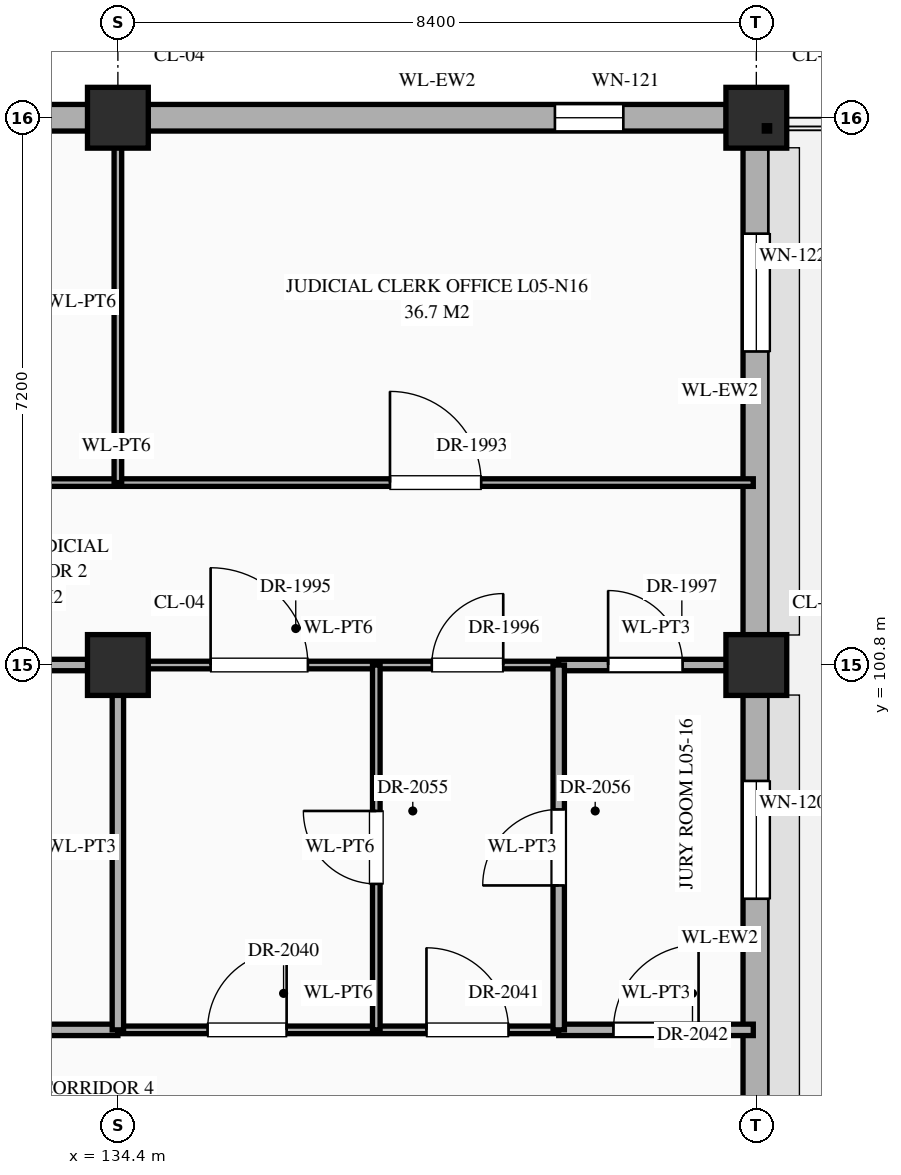
"""IFC4 building model, lengths in metres.
Left out: names, types, materials, properties, quantities, classifications, styles, units other than length and angle.
Written with IfcOpenShell. Run it as: python <this file> out.ifc"""

import sys

from ifc_helpers import new_model, si_unit, direction, frame, frame_2d, origin, origin_2d, place, context, subcontext, project, spatial, rectangle, extrude, element, fill, save


model = new_model("IFC4")
c1 = context("Model", 3, precision=1e-05, world=origin(), true_north=direction((0.0, 1.0)))
c2 = subcontext(c1, "Body", "Model", "MODEL_VIEW")
j1 = project(units=[si_unit("LENGTHUNIT", "METRE"), si_unit("PLANEANGLEUNIT", "RADIAN")], contexts=[c1])
p1 = place(None, origin())
s1 = spatial("IfcSite", under=j1, at=p1, CompositionType="ELEMENT")
p2 = place(p1, origin())
s2 = spatial("IfcBuilding", under=s1, at=p2, CompositionType="ELEMENT")
p3 = place(p2, frame((0.0, 0.0, 21.6)))
s3 = spatial("IfcBuildingStorey", under=s2, at=p3, CompositionType="ELEMENT", Elevation=21.6)
for number, where, z_axis, x_axis in (
    (1, (134.4, 100.8, 0.0), (0.0, 0.0, 1.0), (1.0, 0.0, 0.0)),
    (2, (134.4, 108.0, 0.0), (0.0, 0.0, 1.0), (1.0, 0.0, 0.0)),
    (3, (142.8, 100.8, 0.0), (0.0, 0.0, 1.0), (1.0, 0.0, 0.0)),
    (4, (142.8, 108.0, 0.0), (0.0, 0.0, 1.0), (1.0, 0.0, 0.0)),
):
    element("IfcColumn", number, at=place(p3, frame(where, z_axis=z_axis, x_axis=x_axis)), inside=s3, PredefinedType="COLUMN", context=c2, shape_type="SweptSolid", body=[
        extrude(rectangle(XDim=0.8, YDim=0.8, at=origin_2d()), origin(), (0.0, 0.0, 1.0), 4.5),
    ])
p4 = place(p3, frame((126.395, 108.0, 0.0), z_axis=(0.0, 0.0, 1.0), x_axis=(1.0, 0.0, 0.0)))
e5 = element("IfcWall", 5, at=p4, inside=s3, PredefinedType="STANDARD", context=c2, shape_type="SweptSolid", body=[
    extrude(rectangle(XDim=7.61, YDim=0.35, at=frame_2d((3.805, 0.0))), origin(), (0.0, 0.0, 1.0), 3.59),
])
p5 = place(p4, frame((5.355, 0.0, 0.85)))
e6 = element("IfcOpeningElement", 6, at=p5, cuts=e5, PredefinedType="OPENING", context=c2, shape_type="SweptSolid", body=[
    extrude(rectangle(XDim=0.9, YDim=1.92, at=frame_2d((0.45, 0.96))), frame((0.0, 0.187, 0.0), z_axis=(0.0, -1.0, 0.0), x_axis=(1.0, 0.0, 0.0)), (0.0, 0.0, 1.0), 0.374),
])
p6 = place(p3, frame((142.8, 93.995, 0.0), z_axis=(0.0, 0.0, 1.0), x_axis=(0.0, 1.0, 0.0)))
e7 = element("IfcWall", 7, at=p6, inside=s3, PredefinedType="STANDARD", context=c2, shape_type="SweptSolid", body=[
    extrude(rectangle(XDim=6.41, YDim=0.35, at=frame_2d((3.205, 0.0))), origin(), (0.0, 0.0, 1.0), 3.59),
])
p7 = place(p6, frame((3.73, 0.0, 0.85)))
e8 = element("IfcOpeningElement", 8, at=p7, cuts=e7, PredefinedType="OPENING", context=c2, shape_type="SweptSolid", body=[
    extrude(rectangle(XDim=1.55, YDim=1.38, at=frame_2d((0.775, 0.69))), frame((0.0, 0.187, 0.0), z_axis=(0.0, -1.0, 0.0), x_axis=(1.0, 0.0, 0.0)), (0.0, 0.0, 1.0), 0.374),
])
p8 = place(p3, frame((134.795, 108.0, 0.0), z_axis=(0.0, 0.0, 1.0), x_axis=(1.0, 0.0, 0.0)))
e9 = element("IfcWall", 9, at=p8, inside=s3, PredefinedType="STANDARD", context=c2, shape_type="SweptSolid", body=[
    extrude(rectangle(XDim=7.61, YDim=0.35, at=frame_2d((3.805, 0.0))), origin(), (0.0, 0.0, 1.0), 3.59),
])
p9 = place(p8, frame((5.355, 0.0, 0.85)))
e10 = element("IfcOpeningElement", 10, at=p9, cuts=e9, PredefinedType="OPENING", context=c2, shape_type="SweptSolid", body=[
    extrude(rectangle(XDim=0.9, YDim=2.12, at=frame_2d((0.45, 1.06))), frame((0.0, 0.187, 0.0), z_axis=(0.0, -1.0, 0.0), x_axis=(1.0, 0.0, 0.0)), (0.0, 0.0, 1.0), 0.374),
])
p10 = place(p3, frame((142.8, 101.195, 0.0), z_axis=(0.0, 0.0, 1.0), x_axis=(0.0, 1.0, 0.0)))
e11 = element("IfcWall", 11, at=p10, inside=s3, PredefinedType="STANDARD", context=c2, shape_type="SweptSolid", body=[
    extrude(rectangle(XDim=6.41, YDim=0.35, at=frame_2d((3.205, 0.0))), origin(), (0.0, 0.0, 1.0), 3.59),
])
p11 = place(p10, frame((3.73, 0.0, 0.85)))
e12 = element("IfcOpeningElement", 12, at=p11, cuts=e11, PredefinedType="OPENING", context=c2, shape_type="SweptSolid", body=[
    extrude(rectangle(XDim=1.55, YDim=1.56, at=frame_2d((0.775, 0.78))), frame((0.0, 0.187, 0.0), z_axis=(0.0, -1.0, 0.0), x_axis=(1.0, 0.0, 0.0)), (0.0, 0.0, 1.0), 0.374),
])
p12 = place(p3, frame((115.0, 96.0, 0.0), z_axis=(0.0, 0.0, 1.0), x_axis=(1.0, 0.0, 0.0)))
e13 = element("IfcWall", 13, at=p12, inside=s3, PredefinedType="STANDARD", context=c2, shape_type="SweptSolid", body=[
    extrude(rectangle(XDim=19.4, YDim=0.15, at=frame_2d((9.7, 0.0))), origin(), (0.0, 0.0, 1.0), 4.24),
])
p13 = place(p12, frame((0.81, 0.0, 0.0)))
e14 = element("IfcOpeningElement", 14, at=p13, cuts=e13, PredefinedType="OPENING", context=c2, shape_type="SweptSolid", body=[
    extrude(rectangle(XDim=0.98, YDim=2.35, at=frame_2d((0.49, 1.175))), frame((0.0, 0.087, 0.0), z_axis=(0.0, -1.0, 0.0), x_axis=(1.0, 0.0, 0.0)), (0.0, 0.0, 1.0), 0.174),
])
p14 = place(p12, frame((6.32, 0.0, 0.0)))
e15 = element("IfcOpeningElement", 15, at=p14, cuts=e13, PredefinedType="OPENING", context=c2, shape_type="SweptSolid", body=[
    extrude(rectangle(XDim=0.96, YDim=2.2, at=frame_2d((0.48, 1.1))), frame((0.0, 0.087, 0.0), z_axis=(0.0, -1.0, 0.0), x_axis=(1.0, 0.0, 0.0)), (0.0, 0.0, 1.0), 0.174),
])
p15 = place(p12, frame((14.7, 0.0, 0.0)))
e16 = element("IfcOpeningElement", 16, at=p15, cuts=e13, PredefinedType="OPENING", context=c2, shape_type="SweptSolid", body=[
    extrude(rectangle(XDim=1.0, YDim=2.25, at=frame_2d((0.5, 1.125))), frame((0.0, 0.087, 0.0), z_axis=(0.0, -1.0, 0.0), x_axis=(1.0, 0.0, 0.0)), (0.0, 0.0, 1.0), 0.174),
])
p16 = place(p3, frame((134.4, 96.0, 0.0), z_axis=(0.0, 0.0, 1.0), x_axis=(1.0, 0.0, 0.0)))
e17 = element("IfcWall", 17, at=p16, inside=s3, PredefinedType="STANDARD", context=c2, shape_type="SweptSolid", body=[
    extrude(rectangle(XDim=5.8, YDim=0.1, at=frame_2d((2.9, 0.0))), origin(), (0.0, 0.0, 1.0), 4.24),
])
p17 = place(p16, frame((1.18, 0.0, 0.0)))
e18 = element("IfcOpeningElement", 18, at=p17, cuts=e17, PredefinedType="OPENING", context=c2, shape_type="SweptSolid", body=[
    extrude(rectangle(XDim=1.04, YDim=2.2, at=frame_2d((0.52, 1.1))), frame((0.0, 0.062, 0.0), z_axis=(0.0, -1.0, 0.0), x_axis=(1.0, 0.0, 0.0)), (0.0, 0.0, 1.0), 0.124),
])
p18 = place(p16, frame((4.06, 0.0, 0.0)))
e19 = element("IfcOpeningElement", 19, at=p18, cuts=e17, PredefinedType="OPENING", context=c2, shape_type="SweptSolid", body=[
    extrude(rectangle(XDim=1.08, YDim=2.25, at=frame_2d((0.54, 1.125))), frame((0.0, 0.062, 0.0), z_axis=(0.0, -1.0, 0.0), x_axis=(1.0, 0.0, 0.0)), (0.0, 0.0, 1.0), 0.124),
])
p19 = place(p3, frame((140.2, 96.0, 0.0), z_axis=(0.0, 0.0, 1.0), x_axis=(1.0, 0.0, 0.0)))
e20 = element("IfcWall", 20, at=p19, inside=s3, PredefinedType="STANDARD", context=c2, shape_type="SweptSolid", body=[
    extrude(rectangle(XDim=2.56, YDim=0.15, at=frame_2d((1.28, 0.0))), origin(), (0.0, 0.0, 1.0), 4.24),
])
p20 = place(p19, frame((0.72, 0.0, 0.0)))
e21 = element("IfcOpeningElement", 21, at=p20, cuts=e20, PredefinedType="OPENING", context=c2, shape_type="SweptSolid", body=[
    extrude(rectangle(XDim=1.12, YDim=2.25, at=frame_2d((0.56, 1.125))), frame((0.0, 0.087, 0.0), z_axis=(0.0, -1.0, 0.0), x_axis=(1.0, 0.0, 0.0)), (0.0, 0.0, 1.0), 0.174),
])
p21 = place(p3, frame((126.0, 100.8, 0.0), z_axis=(0.0, 0.0, 1.0), x_axis=(1.0, 0.0, 0.0)))
e22 = element("IfcWall", 22, at=p21, inside=s3, PredefinedType="STANDARD", context=c2, shape_type="SweptSolid", body=[
    extrude(rectangle(XDim=8.4, YDim=0.15, at=frame_2d((4.2, 0.0))), origin(), (0.0, 0.0, 1.0), 3.39),
])
p22 = place(p21, frame((3.58, 0.0, 0.0)))
e23 = element("IfcOpeningElement", 23, at=p22, cuts=e22, PredefinedType="OPENING", context=c2, shape_type="SweptSolid", body=[
    extrude(rectangle(XDim=1.24, YDim=2.3, at=frame_2d((0.62, 1.15))), frame((0.0, 0.087, 0.0), z_axis=(0.0, -1.0, 0.0), x_axis=(1.0, 0.0, 0.0)), (0.0, 0.0, 1.0), 0.174),
])
p23 = place(p3, frame((134.4, 100.8, 0.0), z_axis=(0.0, 0.0, 1.0), x_axis=(1.0, 0.0, 0.0)))
e24 = element("IfcWall", 24, at=p23, inside=s3, PredefinedType="STANDARD", context=c2, shape_type="SweptSolid", body=[
    extrude(rectangle(XDim=5.8, YDim=0.1, at=frame_2d((2.9, 0.0))), origin(), (0.0, 0.0, 1.0), 3.39),
])
p24 = place(p23, frame((1.22, 0.0, 0.0)))
e25 = element("IfcOpeningElement", 25, at=p24, cuts=e24, PredefinedType="OPENING", context=c2, shape_type="SweptSolid", body=[
    extrude(rectangle(XDim=1.28, YDim=2.35, at=frame_2d((0.64, 1.175))), frame((0.0, 0.062, 0.0), z_axis=(0.0, -1.0, 0.0), x_axis=(1.0, 0.0, 0.0)), (0.0, 0.0, 1.0), 0.124),
])
p25 = place(p23, frame((4.13, 0.0, 0.0)))
e26 = element("IfcOpeningElement", 26, at=p25, cuts=e24, PredefinedType="OPENING", context=c2, shape_type="SweptSolid", body=[
    extrude(rectangle(XDim=0.94, YDim=2.3, at=frame_2d((0.47, 1.15))), frame((0.0, 0.062, 0.0), z_axis=(0.0, -1.0, 0.0), x_axis=(1.0, 0.0, 0.0)), (0.0, 0.0, 1.0), 0.124),
])
p26 = place(p3, frame((140.2, 100.8, 0.0), z_axis=(0.0, 0.0, 1.0), x_axis=(1.0, 0.0, 0.0)))
e27 = element("IfcWall", 27, at=p26, inside=s3, PredefinedType="STANDARD", context=c2, shape_type="SweptSolid", body=[
    extrude(rectangle(XDim=2.56, YDim=0.15, at=frame_2d((1.28, 0.0))), origin(), (0.0, 0.0, 1.0), 3.39),
])
p27 = place(p26, frame((0.65, 0.0, 0.0)))
e28 = element("IfcOpeningElement", 28, at=p27, cuts=e27, PredefinedType="OPENING", context=c2, shape_type="SweptSolid", body=[
    extrude(rectangle(XDim=0.98, YDim=2.35, at=frame_2d((0.49, 1.175))), frame((0.0, 0.087, 0.0), z_axis=(0.0, -1.0, 0.0), x_axis=(1.0, 0.0, 0.0)), (0.0, 0.0, 1.0), 0.174),
])
p28 = place(p3, frame((126.0, 103.2, 0.0), z_axis=(0.0, 0.0, 1.0), x_axis=(1.0, 0.0, 0.0)))
e29 = element("IfcWall", 29, at=p28, inside=s3, PredefinedType="STANDARD", context=c2, shape_type="SweptSolid", body=[
    extrude(rectangle(XDim=16.76, YDim=0.1, at=frame_2d((8.38, 0.0))), origin(), (0.0, 0.0, 1.0), 4.24),
])
p29 = place(p28, frame((3.62, 0.0, 0.0)))
e30 = element("IfcOpeningElement", 30, at=p29, cuts=e29, PredefinedType="OPENING", context=c2, shape_type="SweptSolid", body=[
    extrude(rectangle(XDim=1.16, YDim=2.3, at=frame_2d((0.58, 1.15))), frame((0.0, 0.062, 0.0), z_axis=(0.0, -1.0, 0.0), x_axis=(1.0, 0.0, 0.0)), (0.0, 0.0, 1.0), 0.124),
])
p30 = place(p28, frame((11.98, 0.0, 0.0)))
e31 = element("IfcOpeningElement", 31, at=p30, cuts=e29, PredefinedType="OPENING", context=c2, shape_type="SweptSolid", body=[
    extrude(rectangle(XDim=1.2, YDim=2.35, at=frame_2d((0.6, 1.175))), frame((0.0, 0.062, 0.0), z_axis=(0.0, -1.0, 0.0), x_axis=(1.0, 0.0, 0.0)), (0.0, 0.0, 1.0), 0.124),
])
p31 = place(p3, frame((134.4, 96.0, 0.0), z_axis=(0.0, 0.0, 1.0), x_axis=(0.0, 1.0, 0.0)))
e32 = element("IfcWall", 32, at=p31, inside=s3, PredefinedType="STANDARD", context=c2, shape_type="SweptSolid", body=[
    extrude(rectangle(XDim=4.8, YDim=0.15, at=frame_2d((2.4, 0.0))), origin(), (0.0, 0.0, 1.0), 4.24),
])
p32 = place(p3, frame((134.4, 103.2, 0.0), z_axis=(0.0, 0.0, 1.0), x_axis=(0.0, 1.0, 0.0)))
e33 = element("IfcWall", 33, at=p32, inside=s3, PredefinedType="STANDARD", context=c2, shape_type="SweptSolid", body=[
    extrude(rectangle(XDim=4.76, YDim=0.1, at=frame_2d((2.38, 0.0))), origin(), (0.0, 0.0, 1.0), 3.49),
])
p33 = place(p3, frame((137.8, 96.0, 0.0), z_axis=(0.0, 0.0, 1.0), x_axis=(0.0, 1.0, 0.0)))
e34 = element("IfcWall", 34, at=p33, inside=s3, PredefinedType="STANDARD", context=c2, shape_type="SweptSolid", body=[
    extrude(rectangle(XDim=4.8, YDim=0.1, at=frame_2d((2.4, 0.0))), origin(), (0.0, 0.0, 1.0), 4.24),
])
p34 = place(p33, frame((1.92, 0.0, 0.0)))
e35 = element("IfcOpeningElement", 35, at=p34, cuts=e34, PredefinedType="OPENING", context=c2, shape_type="SweptSolid", body=[
    extrude(rectangle(XDim=0.96, YDim=2.2, at=frame_2d((0.48, 1.1))), frame((0.0, 0.062, 0.0), z_axis=(0.0, -1.0, 0.0), x_axis=(1.0, 0.0, 0.0)), (0.0, 0.0, 1.0), 0.124),
])
p35 = place(p3, frame((140.2, 96.0, 0.0), z_axis=(0.0, 0.0, 1.0), x_axis=(0.0, 1.0, 0.0)))
e36 = element("IfcWall", 36, at=p35, inside=s3, PredefinedType="STANDARD", context=c2, shape_type="SweptSolid", body=[
    extrude(rectangle(XDim=4.8, YDim=0.15, at=frame_2d((2.4, 0.0))), origin(), (0.0, 0.0, 1.0), 4.24),
])
p36 = place(p35, frame((1.9, 0.0, 0.0)))
e37 = element("IfcOpeningElement", 37, at=p36, cuts=e36, PredefinedType="OPENING", context=c2, shape_type="SweptSolid", body=[
    extrude(rectangle(XDim=1.0, YDim=2.25, at=frame_2d((0.5, 1.125))), frame((0.0, 0.087, 0.0), z_axis=(0.0, -1.0, 0.0), x_axis=(1.0, 0.0, 0.0)), (0.0, 0.0, 1.0), 0.174),
])
p37 = place(p7, origin())
e38 = element("IfcWindow", 38, at=p37, inside=s3, PartitioningType="SINGLE_PANEL", PredefinedType="WINDOW", context=c2, shape_type="SweptSolid", body=[
    extrude(rectangle(XDim=1.55, YDim=1.38, at=frame_2d((0.775, 0.69))), frame((0.0, 0.03, 0.0), z_axis=(0.0, -1.0, 0.0), x_axis=(1.0, 0.0, 0.0)), (0.0, 0.0, 1.0), 0.06),
])
fill(e8, e38)
p38 = place(p9, origin())
e39 = element("IfcWindow", 39, at=p38, inside=s3, PartitioningType="SINGLE_PANEL", PredefinedType="WINDOW", context=c2, shape_type="SweptSolid", body=[
    extrude(rectangle(XDim=0.9, YDim=2.12, at=frame_2d((0.45, 1.06))), frame((0.0, 0.03, 0.0), z_axis=(0.0, -1.0, 0.0), x_axis=(1.0, 0.0, 0.0)), (0.0, 0.0, 1.0), 0.06),
])
fill(e10, e39)
p39 = place(p11, origin())
e40 = element("IfcWindow", 40, at=p39, inside=s3, PartitioningType="SINGLE_PANEL", PredefinedType="WINDOW", context=c2, shape_type="SweptSolid", body=[
    extrude(rectangle(XDim=1.55, YDim=1.56, at=frame_2d((0.775, 0.78))), frame((0.0, 0.03, 0.0), z_axis=(0.0, -1.0, 0.0), x_axis=(1.0, 0.0, 0.0)), (0.0, 0.0, 1.0), 0.06),
])
fill(e12, e40)
p40 = place(p30, origin())
e41 = element("IfcDoor", 41, at=p40, inside=s3, OperationType="SINGLE_SWING_LEFT", PredefinedType="DOOR", context=c2, shape_type="SweptSolid", body=[
    extrude(rectangle(XDim=1.2, YDim=2.35, at=frame_2d((0.6, 1.175))), frame((0.0, 0.025, 0.0), z_axis=(0.0, -1.0, 0.0), x_axis=(1.0, 0.0, 0.0)), (0.0, 0.0, 1.0), 0.05),
])
fill(e31, e41)
p41 = place(p24, origin())
e42 = element("IfcDoor", 42, at=p41, inside=s3, OperationType="SINGLE_SWING_LEFT", PredefinedType="DOOR", context=c2, shape_type="SweptSolid", body=[
    extrude(rectangle(XDim=1.28, YDim=2.35, at=frame_2d((0.64, 1.175))), frame((0.0, 0.025, 0.0), z_axis=(0.0, -1.0, 0.0), x_axis=(1.0, 0.0, 0.0)), (0.0, 0.0, 1.0), 0.05),
])
fill(e25, e42)
p42 = place(p25, origin())
e43 = element("IfcDoor", 43, at=p42, inside=s3, OperationType="SINGLE_SWING_RIGHT", PredefinedType="DOOR", context=c2, shape_type="SweptSolid", body=[
    extrude(rectangle(XDim=0.94, YDim=2.3, at=frame_2d((0.47, 1.15))), frame((0.0, 0.025, 0.0), z_axis=(0.0, -1.0, 0.0), x_axis=(1.0, 0.0, 0.0)), (0.0, 0.0, 1.0), 0.05),
])
fill(e26, e43)
p43 = place(p27, origin())
e44 = element("IfcDoor", 44, at=p43, inside=s3, OperationType="SINGLE_SWING_LEFT", PredefinedType="DOOR", context=c2, shape_type="SweptSolid", body=[
    extrude(rectangle(XDim=0.98, YDim=2.35, at=frame_2d((0.49, 1.175))), frame((0.0, 0.025, 0.0), z_axis=(0.0, -1.0, 0.0), x_axis=(1.0, 0.0, 0.0)), (0.0, 0.0, 1.0), 0.05),
])
fill(e28, e44)
p44 = place(p17, origin())
e45 = element("IfcDoor", 45, at=p44, inside=s3, OperationType="SINGLE_SWING_RIGHT", PredefinedType="DOOR", context=c2, shape_type="SweptSolid", body=[
    extrude(rectangle(XDim=1.04, YDim=2.2, at=frame_2d((0.52, 1.1))), frame((0.0, 0.025, 0.0), z_axis=(0.0, -1.0, 0.0), x_axis=(1.0, 0.0, 0.0)), (0.0, 0.0, 1.0), 0.05),
])
fill(e18, e45)
p45 = place(p18, origin())
e46 = element("IfcDoor", 46, at=p45, inside=s3, OperationType="SINGLE_SWING_LEFT", PredefinedType="DOOR", context=c2, shape_type="SweptSolid", body=[
    extrude(rectangle(XDim=1.08, YDim=2.25, at=frame_2d((0.54, 1.125))), frame((0.0, 0.025, 0.0), z_axis=(0.0, -1.0, 0.0), x_axis=(1.0, 0.0, 0.0)), (0.0, 0.0, 1.0), 0.05),
])
fill(e19, e46)
p46 = place(p20, origin())
e47 = element("IfcDoor", 47, at=p46, inside=s3, OperationType="SINGLE_SWING_RIGHT", PredefinedType="DOOR", context=c2, shape_type="SweptSolid", body=[
    extrude(rectangle(XDim=1.12, YDim=2.25, at=frame_2d((0.56, 1.125))), frame((0.0, 0.025, 0.0), z_axis=(0.0, -1.0, 0.0), x_axis=(1.0, 0.0, 0.0)), (0.0, 0.0, 1.0), 0.05),
])
fill(e21, e47)
p47 = place(p34, origin())
e48 = element("IfcDoor", 48, at=p47, inside=s3, OperationType="SINGLE_SWING_RIGHT", PredefinedType="DOOR", context=c2, shape_type="SweptSolid", body=[
    extrude(rectangle(XDim=0.96, YDim=2.2, at=frame_2d((0.48, 1.1))), frame((0.0, 0.025, 0.0), z_axis=(0.0, -1.0, 0.0), x_axis=(1.0, 0.0, 0.0)), (0.0, 0.0, 1.0), 0.05),
])
fill(e35, e48)
p48 = place(p36, origin())
e49 = element("IfcDoor", 49, at=p48, inside=s3, OperationType="SINGLE_SWING_LEFT", PredefinedType="DOOR", context=c2, shape_type="SweptSolid", body=[
    extrude(rectangle(XDim=1.0, YDim=2.25, at=frame_2d((0.5, 1.125))), frame((0.0, 0.025, 0.0), z_axis=(0.0, -1.0, 0.0), x_axis=(1.0, 0.0, 0.0)), (0.0, 0.0, 1.0), 0.05),
])
fill(e37, e49)
save(model, sys.argv[1])
